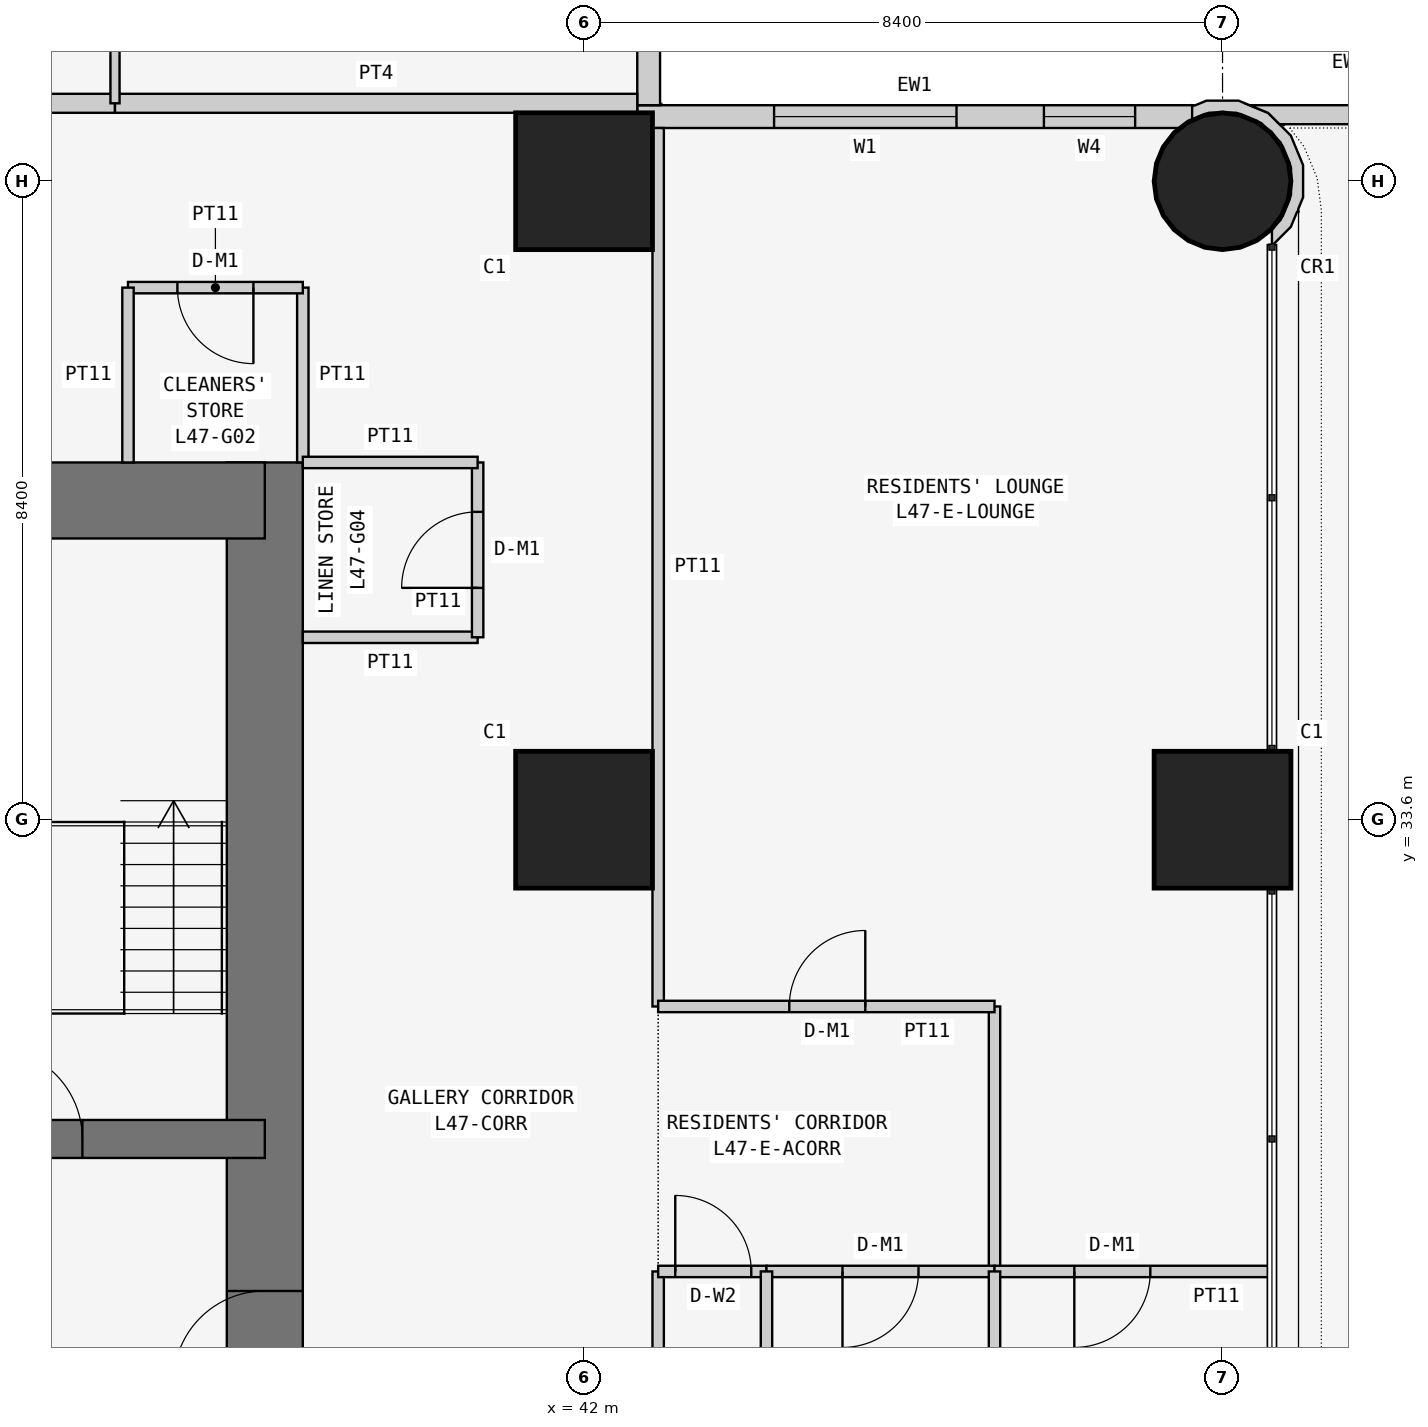
"""IFC4 building model, lengths in metres.
Left out: names, types, materials, properties, quantities, classifications, styles, units other than length and angle.
Written with IfcOpenShell. Run it as: python <this file> out.ifc"""

import sys

from ifc_helpers import new_model, si_unit, direction, frame, frame_2d, origin, origin_2d, place, context, subcontext, project, spatial, polyline, rectangle, circle, outline, extrude, element, fill, save


model = new_model("IFC4")
c1 = context("Model", 3, precision=1e-05, world=origin(), true_north=direction((0.0, 1.0)))
c2 = subcontext(c1, "Body", "Model", "MODEL_VIEW")
j1 = project(units=[si_unit("LENGTHUNIT", "METRE"), si_unit("PLANEANGLEUNIT", "RADIAN")], contexts=[c1])
p1 = place(None, origin())
s1 = spatial("IfcSite", under=j1, at=p1, CompositionType="ELEMENT")
p2 = place(p1, origin())
s2 = spatial("IfcBuilding", under=s1, at=p2, CompositionType="ELEMENT")
p3 = place(p2, frame((0.0, 0.0, 183.3)))
s3 = spatial("IfcBuildingStorey", under=s2, at=p3, CompositionType="ELEMENT", Elevation=183.3)
for number, where, z_axis, x_axis in (
    (1, (42.0, 33.6, 0.0), (0.0, 0.0, 1.0), (1.0, 0.0, 0.0)),
    (2, (42.0, 42.0, 0.0), (0.0, 0.0, 1.0), (1.0, 0.0, 0.0)),
    (3, (50.4, 33.6, 0.0), (0.0, 0.0, 1.0), (1.0, 0.0, 0.0)),
):
    element("IfcColumn", number, at=place(p3, frame(where, z_axis=z_axis, x_axis=x_axis)), inside=s3, PredefinedType="COLUMN", context=c2, shape_type="SweptSolid", body=[
        extrude(rectangle(XDim=1.8, YDim=1.8, at=origin_2d()), origin(), (0.0, 0.0, 1.0), 3.6),
    ])
p4 = place(p3, frame((50.4, 42.0, 0.0), z_axis=(0.0, 0.0, 1.0), x_axis=(1.0, 0.0, 0.0)))
e4 = element("IfcColumn", 4, at=p4, inside=s3, PredefinedType="COLUMN", context=c2, shape_type="SweptSolid", body=[
    extrude(circle(Radius=0.9, at=origin_2d()), origin(), (0.0, 0.0, 1.0), 3.6),
])
p5 = place(p3, frame((37.8, 21.0, 0.0), z_axis=(0.0, 0.0, 1.0), x_axis=(0.0, 1.0, 0.0)))
e5 = element("IfcWall", 5, at=p5, inside=s3, PredefinedType="SHEAR", context=c2, shape_type="SweptSolid", body=[
    extrude(rectangle(XDim=17.3, YDim=1.0, at=frame_2d((8.65, 0.0))), origin(), (0.0, 0.0, 1.0), 3.6),
])
p6 = place(p5, frame((5.2, 0.0, 0.0)))
e6 = element("IfcOpeningElement", 6, at=p6, cuts=e5, PredefinedType="OPENING", context=c2, shape_type="SweptSolid", body=[
    extrude(rectangle(XDim=1.2, YDim=2.1, at=frame_2d((0.6, 1.05))), frame((0.0, 0.51, 0.0), z_axis=(0.0, -1.0, 0.0), x_axis=(1.0, 0.0, 0.0)), (0.0, 0.0, 1.0), 1.02),
])
p7 = place(p3, frame((37.8, 37.8, 0.0), z_axis=(0.0, 0.0, 1.0), x_axis=(-1.0, 0.0, 0.0)))
e7 = element("IfcWall", 7, at=p7, inside=s3, PredefinedType="SHEAR", context=c2, shape_type="SweptSolid", body=[
    extrude(rectangle(XDim=17.3, YDim=1.0, at=frame_2d((8.65, 0.0))), origin(), (0.0, 0.0, 1.0), 3.6),
])
p8 = place(p3, frame((32.2, 29.4, 0.0), z_axis=(0.0, 0.0, 1.0), x_axis=(1.0, 0.0, 0.0)))
e8 = element("IfcWall", 8, at=p8, inside=s3, PredefinedType="SHEAR", context=c2, shape_type="SweptSolid", body=[
    extrude(rectangle(XDim=5.6, YDim=0.5, at=frame_2d((2.8, 0.0))), origin(), (0.0, 0.0, 1.0), 3.6),
])
p9 = place(p8, frame((2.0, 0.0, 0.0)))
e9 = element("IfcOpeningElement", 9, at=p9, cuts=e8, PredefinedType="OPENING", context=c2, shape_type="SweptSolid", body=[
    extrude(rectangle(XDim=1.2, YDim=2.1, at=frame_2d((0.6, 1.05))), frame((0.0, 0.26, 0.0), z_axis=(0.0, -1.0, 0.0), x_axis=(1.0, 0.0, 0.0)), (0.0, 0.0, 1.0), 0.52),
])
p10 = place(p3, frame((50.0, 42.85, 0.0), z_axis=(0.0, 0.0, 1.0), x_axis=(-1.0, 0.0, 0.0)))
e10 = element("IfcWall", 10, at=p10, inside=s3, PredefinedType="SOLIDWALL", context=c2, shape_type="SweptSolid", body=[
    extrude(rectangle(XDim=7.3, YDim=0.3, at=frame_2d((3.65, 0.0))), origin(), (0.0, 0.0, 1.0), 3.45),
])
p11 = place(p10, frame((3.1, 0.0, 0.9)))
e11 = element("IfcOpeningElement", 11, at=p11, cuts=e10, PredefinedType="OPENING", context=c2, shape_type="SweptSolid", body=[
    extrude(rectangle(XDim=2.4, YDim=1.5, at=frame_2d((1.2, 0.75))), frame((0.0, 0.16, 0.0), z_axis=(0.0, -1.0, 0.0), x_axis=(1.0, 0.0, 0.0)), (0.0, 0.0, 1.0), 0.32),
])
p12 = place(p10, frame((0.75, 0.0, 0.9)))
e12 = element("IfcOpeningElement", 12, at=p12, cuts=e10, PredefinedType="OPENING", context=c2, shape_type="SweptSolid", body=[
    extrude(rectangle(XDim=1.2, YDim=1.5, at=frame_2d((0.6, 0.75))), frame((0.0, 0.16, 0.0), z_axis=(0.0, -1.0, 0.0), x_axis=(1.0, 0.0, 0.0)), (0.0, 0.0, 1.0), 0.32),
])
p13 = place(p3, frame((42.85, 43.0, 0.0), z_axis=(0.0, 0.0, 1.0), x_axis=(0.0, 1.0, 0.0)))
e13 = element("IfcWall", 13, at=p13, inside=s3, PredefinedType="SOLIDWALL", context=c2, shape_type="SweptSolid", body=[
    extrude(rectangle(XDim=7.0, YDim=0.3, at=frame_2d((3.5, 0.0))), origin(), (0.0, 0.0, 1.0), 3.45),
])
p14 = place(p13, frame((1.5, 0.0, 0.9)))
e14 = element("IfcOpeningElement", 14, at=p14, cuts=e13, PredefinedType="OPENING", context=c2, shape_type="SweptSolid", body=[
    extrude(rectangle(XDim=2.4, YDim=1.5, at=frame_2d((1.2, 0.75))), frame((0.0, 0.16, 0.0), z_axis=(0.0, -1.0, 0.0), x_axis=(1.0, 0.0, 0.0)), (0.0, 0.0, 1.0), 0.32),
])
p15 = place(p13, frame((5.05, 0.0, 0.9)))
e15 = element("IfcOpeningElement", 15, at=p15, cuts=e13, PredefinedType="OPENING", context=c2, shape_type="SweptSolid", body=[
    extrude(rectangle(XDim=1.2, YDim=1.5, at=frame_2d((0.6, 0.75))), frame((0.0, 0.16, 0.0), z_axis=(0.0, -1.0, 0.0), x_axis=(1.0, 0.0, 0.0)), (0.0, 0.0, 1.0), 0.32),
])
p16 = place(p3, frame((51.011, 41.233, 0.0), z_axis=(0.0, 0.0, 1.0), x_axis=(0.926129809145, 0.377204953059, 0.0)))
e16 = element("IfcWall", 16, at=p16, inside=s3, PredefinedType="SOLIDWALL", context=c2, shape_type="SweptSolid", body=[
    extrude(outline(polyline([(0.626, 0.345), (0.785, 0.736), (0.782, 1.157), (0.619, 1.546), (0.319, 1.842), (-0.072, 2.002), (-0.24, 2.0), (-0.27, 2.017), (-0.37, 1.841), (-0.102, 1.842), (0.229, 1.707), (0.485, 1.455), (0.624, 1.125), (0.626, 0.766), (0.491, 0.434), (0.239, 0.179), (0.09, 0.117), (0.011, -0.078), (0.025, -0.083), (0.329, 0.045), (0.48, 0.198), (0.499, 0.193), (0.507, 0.225), (0.626, 0.345)])), origin(), (0.0, 0.0, 1.0), 3.45),
])
p17 = place(p3, origin())
e17 = element("IfcWall", 17, at=p17, inside=s3, PredefinedType="PARAPET", context=c2, shape_type="SweptSolid", body=[
    extrude(outline(polyline([(59.1, 42.812), (59.39, 42.59), (59.612, 42.3), (59.752, 41.962), (59.8, 41.6), (59.8, 17.2), (59.752, 16.838), (59.612, 16.5), (59.39, 16.21), (59.1, 15.988), (58.762, 15.848), (58.4, 15.8), (50.756, 15.8), (51.0, 15.901), (51.159, 16.06), (51.19, 16.06), (51.182, 16.05), (58.384, 16.05), (58.697, 16.091), (58.974, 16.206), (59.212, 16.388), (59.394, 16.626), (59.509, 16.903), (59.55, 17.216), (59.55, 41.583), (59.509, 41.897), (59.394, 42.174), (59.212, 42.412), (58.974, 42.594), (58.697, 42.709), (58.384, 42.75), (51.182, 42.75), (51.19, 42.74), (51.159, 42.74), (51.0, 42.899), (50.756, 43.0), (58.4, 43.0), (58.762, 42.952), (59.1, 42.812)])), origin(), (0.0, 0.0, 1.0), 1.25),
])
p18 = place(p3, frame((38.3, 38.3, 0.0), z_axis=(0.0, 0.0, 1.0), x_axis=(0.0, 1.0, 0.0)))
e18 = element("IfcWall", 18, at=p18, inside=s3, PredefinedType="PARTITIONING", context=c2, shape_type="SweptSolid", body=[
    extrude(rectangle(XDim=2.3, YDim=0.15, at=frame_2d((1.15, 0.0))), origin(), (0.0, 0.0, 1.0), 3.45),
])
p19 = place(p3, frame((38.3, 40.6, 0.0), z_axis=(0.0, 0.0, 1.0), x_axis=(-1.0, 0.0, 0.0)))
e19 = element("IfcWall", 19, at=p19, inside=s3, PredefinedType="PARTITIONING", context=c2, shape_type="SweptSolid", body=[
    extrude(rectangle(XDim=2.3, YDim=0.15, at=frame_2d((1.15, 0.0))), origin(), (0.0, 0.0, 1.0), 3.45),
])
p20 = place(p19, frame((0.65, 0.0, 0.0)))
e20 = element("IfcOpeningElement", 20, at=p20, cuts=e19, PredefinedType="OPENING", context=c2, shape_type="SweptSolid", body=[
    extrude(rectangle(XDim=1.0, YDim=2.1, at=frame_2d((0.5, 1.05))), frame((0.0, 0.085, 0.0), z_axis=(0.0, -1.0, 0.0), x_axis=(1.0, 0.0, 0.0)), (0.0, 0.0, 1.0), 0.17),
])
for number, where, z_axis, x_axis in (
    (21, (36.0, 40.6, 0.0), (0.0, 0.0, 1.0), (0.0, -1.0, 0.0)),
    (22, (38.3, 36.0, 0.0), (0.0, 0.0, 1.0), (1.0, 0.0, 0.0)),
):
    element("IfcWall", number, at=place(p3, frame(where, z_axis=z_axis, x_axis=x_axis)), inside=s3, PredefinedType="PARTITIONING", context=c2, shape_type="SweptSolid", body=[
        extrude(rectangle(XDim=2.3, YDim=0.15, at=frame_2d((1.15, 0.0))), origin(), (0.0, 0.0, 1.0), 3.45),
    ])
p21 = place(p3, frame((40.6, 36.0, 0.0), z_axis=(0.0, 0.0, 1.0), x_axis=(0.0, 1.0, 0.0)))
e23 = element("IfcWall", 23, at=p21, inside=s3, PredefinedType="PARTITIONING", context=c2, shape_type="SweptSolid", body=[
    extrude(rectangle(XDim=2.3, YDim=0.15, at=frame_2d((1.15, 0.0))), origin(), (0.0, 0.0, 1.0), 3.45),
])
p22 = place(p21, frame((0.65, 0.0, 0.0)))
e24 = element("IfcOpeningElement", 24, at=p22, cuts=e23, PredefinedType="OPENING", context=c2, shape_type="SweptSolid", body=[
    extrude(rectangle(XDim=1.0, YDim=2.1, at=frame_2d((0.5, 1.05))), frame((0.0, 0.085, 0.0), z_axis=(0.0, -1.0, 0.0), x_axis=(1.0, 0.0, 0.0)), (0.0, 0.0, 1.0), 0.17),
])
p23 = place(p3, frame((40.6, 38.3, 0.0), z_axis=(0.0, 0.0, 1.0), x_axis=(-1.0, 0.0, 0.0)))
e25 = element("IfcWall", 25, at=p23, inside=s3, PredefinedType="PARTITIONING", context=c2, shape_type="SweptSolid", body=[
    extrude(rectangle(XDim=2.3, YDim=0.15, at=frame_2d((1.15, 0.0))), origin(), (0.0, 0.0, 1.0), 3.45),
])
p24 = place(p3, frame((29.4, 43.025, 0.0), z_axis=(0.0, 0.0, 1.0), x_axis=(1.0, 0.0, 0.0)))
e26 = element("IfcWall", 26, at=p24, inside=s3, PredefinedType="PARTITIONING", context=c2, shape_type="SweptSolid", body=[
    extrude(rectangle(XDim=6.429, YDim=0.25, at=frame_2d((3.215, 0.0))), origin(), (0.0, 0.0, 1.0), 3.45),
])
p25 = place(p24, frame((0.5, 0.0, 0.0)))
e27 = element("IfcOpeningElement", 27, at=p25, cuts=e26, PredefinedType="OPENING", context=c2, shape_type="SweptSolid", body=[
    extrude(rectangle(XDim=1.0, YDim=2.1, at=frame_2d((0.5, 1.05))), frame((0.0, 0.135, 0.0), z_axis=(0.0, -1.0, 0.0), x_axis=(1.0, 0.0, 0.0)), (0.0, 0.0, 1.0), 0.27),
])
p26 = place(p3, frame((35.829, 43.025, 0.0), z_axis=(0.0, 0.0, 1.0), x_axis=(1.0, 0.0, 0.0)))
e28 = element("IfcWall", 28, at=p26, inside=s3, PredefinedType="PARTITIONING", context=c2, shape_type="SweptSolid", body=[
    extrude(rectangle(XDim=6.871, YDim=0.25, at=frame_2d((3.436, 0.0))), origin(), (0.0, 0.0, 1.0), 3.45),
])
for number, where, z_axis, x_axis in (
    (29, (42.975, 42.7, 0.0), (0.0, 0.0, 1.0), (0.0, -1.0, 0.0)),
    (30, (42.975, 27.657, 0.0), (0.0, 0.0, 1.0), (0.0, -1.0, 0.0)),
):
    element("IfcWall", number, at=place(p3, frame(where, z_axis=z_axis, x_axis=x_axis)), inside=s3, PredefinedType="PARTITIONING", context=c2, shape_type="SweptSolid", body=[
        extrude(rectangle(XDim=11.557, YDim=0.15, at=frame_2d((5.778, 0.0))), origin(), (0.0, 0.0, 1.0), 3.45),
    ])
p27 = place(p3, frame((35.829, 47.8, 0.0), z_axis=(0.0, 0.0, 1.0), x_axis=(0.0, -1.0, 0.0)))
e31 = element("IfcWall", 31, at=p27, inside=s3, PredefinedType="PARTITIONING", context=c2, shape_type="SweptSolid", body=[
    extrude(rectangle(XDim=4.775, YDim=0.12, at=frame_2d((2.388, 0.0))), origin(), (0.0, 0.0, 1.0), 3.45),
])
p28 = place(p27, frame((1.85, 0.0, 0.0)))
e32 = element("IfcOpeningElement", 32, at=p28, cuts=e31, PredefinedType="OPENING", context=c2, shape_type="SweptSolid", body=[
    extrude(rectangle(XDim=0.9, YDim=2.1, at=frame_2d((0.45, 1.05))), frame((0.0, 0.07, 0.0), z_axis=(0.0, -1.0, 0.0), x_axis=(1.0, 0.0, 0.0)), (0.0, 0.0, 1.0), 0.14),
])
p29 = place(p3, frame((47.4, 27.657, 0.0), z_axis=(0.0, 0.0, 1.0), x_axis=(0.0, 1.0, 0.0)))
e33 = element("IfcWall", 33, at=p29, inside=s3, PredefinedType="PARTITIONING", context=c2, shape_type="SweptSolid", body=[
    extrude(rectangle(XDim=3.486, YDim=0.15, at=frame_2d((1.743, 0.0))), origin(), (0.0, 0.0, 1.0), 3.45),
])
p30 = place(p3, frame((47.4, 31.143, 0.0), z_axis=(0.0, 0.0, 1.0), x_axis=(-1.0, 0.0, 0.0)))
e34 = element("IfcWall", 34, at=p30, inside=s3, PredefinedType="PARTITIONING", context=c2, shape_type="SweptSolid", body=[
    extrude(rectangle(XDim=4.425, YDim=0.15, at=frame_2d((2.212, 0.0))), origin(), (0.0, 0.0, 1.0), 3.45),
])
p31 = place(p30, frame((1.7, 0.0, 0.0)))
e35 = element("IfcOpeningElement", 35, at=p31, cuts=e34, PredefinedType="OPENING", context=c2, shape_type="SweptSolid", body=[
    extrude(rectangle(XDim=1.0, YDim=2.1, at=frame_2d((0.5, 1.05))), frame((0.0, 0.085, 0.0), z_axis=(0.0, -1.0, 0.0), x_axis=(1.0, 0.0, 0.0)), (0.0, 0.0, 1.0), 0.17),
])
p32 = place(p3, frame((42.975, 27.657, 0.0), z_axis=(0.0, 0.0, 1.0), x_axis=(1.0, 0.0, 0.0)))
e36 = element("IfcWall", 36, at=p32, inside=s3, PredefinedType="PARTITIONING", context=c2, shape_type="SweptSolid", body=[
    extrude(rectangle(XDim=1.425, YDim=0.15, at=frame_2d((0.712, 0.0))), origin(), (0.0, 0.0, 1.0), 3.45),
])
p33 = place(p32, frame((0.225, 0.0, 0.0)))
e37 = element("IfcOpeningElement", 37, at=p33, cuts=e36, PredefinedType="OPENING", context=c2, shape_type="SweptSolid", body=[
    extrude(rectangle(XDim=1.0, YDim=2.1, at=frame_2d((0.5, 1.05))), frame((0.0, 0.085, 0.0), z_axis=(0.0, -1.0, 0.0), x_axis=(1.0, 0.0, 0.0)), (0.0, 0.0, 1.0), 0.17),
])
p34 = place(p3, frame((44.4, 27.657, 0.0), z_axis=(0.0, 0.0, 1.0), x_axis=(1.0, 0.0, 0.0)))
e38 = element("IfcWall", 38, at=p34, inside=s3, PredefinedType="PARTITIONING", context=c2, shape_type="SweptSolid", body=[
    extrude(rectangle(XDim=3.0, YDim=0.15, at=frame_2d((1.5, 0.0))), origin(), (0.0, 0.0, 1.0), 3.45),
])
p35 = place(p34, frame((1.0, 0.0, 0.0)))
e39 = element("IfcOpeningElement", 39, at=p35, cuts=e38, PredefinedType="OPENING", context=c2, shape_type="SweptSolid", body=[
    extrude(rectangle(XDim=1.0, YDim=2.1, at=frame_2d((0.5, 1.05))), frame((0.0, 0.085, 0.0), z_axis=(0.0, -1.0, 0.0), x_axis=(1.0, 0.0, 0.0)), (0.0, 0.0, 1.0), 0.17),
])
p36 = place(p3, frame((51.05, 27.657, 0.0), z_axis=(0.0, 0.0, 1.0), x_axis=(-1.0, 0.0, 0.0)))
e40 = element("IfcWall", 40, at=p36, inside=s3, PredefinedType="PARTITIONING", context=c2, shape_type="SweptSolid", body=[
    extrude(rectangle(XDim=3.65, YDim=0.15, at=frame_2d((1.825, 0.0))), origin(), (0.0, 0.0, 1.0), 3.45),
])
p37 = place(p36, frame((1.6, 0.0, 0.0)))
e41 = element("IfcOpeningElement", 41, at=p37, cuts=e40, PredefinedType="OPENING", context=c2, shape_type="SweptSolid", body=[
    extrude(rectangle(XDim=1.0, YDim=2.1, at=frame_2d((0.5, 1.05))), frame((0.0, 0.085, 0.0), z_axis=(0.0, -1.0, 0.0), x_axis=(1.0, 0.0, 0.0)), (0.0, 0.0, 1.0), 0.17),
])
for number, where, z_axis, x_axis in (
    (42, (44.4, 16.1, 0.0), (0.0, 0.0, 1.0), (0.0, 1.0, 0.0)),
    (43, (47.4, 16.1, 0.0), (0.0, 0.0, 1.0), (0.0, 1.0, 0.0)),
):
    element("IfcWall", number, at=place(p3, frame(where, z_axis=z_axis, x_axis=x_axis)), inside=s3, PredefinedType="PARTITIONING", context=c2, shape_type="SweptSolid", body=[
        extrude(rectangle(XDim=11.557, YDim=0.15, at=frame_2d((5.778, 0.0))), origin(), (0.0, 0.0, 1.0), 3.45),
    ])
p38 = place(p11, origin())
e44 = element("IfcWindow", 44, at=p38, inside=s3, PartitioningType="SINGLE_PANEL", PredefinedType="WINDOW", context=c2, shape_type="SweptSolid", body=[
    extrude(rectangle(XDim=2.4, YDim=1.5, at=frame_2d((1.2, 0.75))), frame((0.0, 0.03, 0.0), z_axis=(0.0, -1.0, 0.0), x_axis=(1.0, 0.0, 0.0)), (0.0, 0.0, 1.0), 0.06),
])
fill(e11, e44)
p39 = place(p12, origin())
e45 = element("IfcWindow", 45, at=p39, inside=s3, PartitioningType="SINGLE_PANEL", PredefinedType="WINDOW", context=c2, shape_type="SweptSolid", body=[
    extrude(rectangle(XDim=1.2, YDim=1.5, at=frame_2d((0.6, 0.75))), frame((0.0, 0.03, 0.0), z_axis=(0.0, -1.0, 0.0), x_axis=(1.0, 0.0, 0.0)), (0.0, 0.0, 1.0), 0.06),
])
fill(e12, e45)
p40 = place(p20, origin())
e46 = element("IfcDoor", 46, at=p40, inside=s3, OperationType="SINGLE_SWING_LEFT", PredefinedType="DOOR", context=c2, shape_type="SweptSolid", body=[
    extrude(rectangle(XDim=1.0, YDim=2.1, at=frame_2d((0.5, 1.05))), frame((0.0, 0.025, 0.0), z_axis=(0.0, -1.0, 0.0), x_axis=(1.0, 0.0, 0.0)), (0.0, 0.0, 1.0), 0.05),
])
fill(e20, e46)
p41 = place(p22, origin())
e47 = element("IfcDoor", 47, at=p41, inside=s3, OperationType="SINGLE_SWING_LEFT", PredefinedType="DOOR", context=c2, shape_type="SweptSolid", body=[
    extrude(rectangle(XDim=1.0, YDim=2.1, at=frame_2d((0.5, 1.05))), frame((0.0, 0.025, 0.0), z_axis=(0.0, -1.0, 0.0), x_axis=(1.0, 0.0, 0.0)), (0.0, 0.0, 1.0), 0.05),
])
fill(e24, e47)
p42 = place(p31, frame((1.0, 0.0, 0.0), z_axis=(0.0, 0.0, 1.0), x_axis=(-1.0, 0.0, 0.0)))
e48 = element("IfcDoor", 48, at=p42, inside=s3, OperationType="SINGLE_SWING_RIGHT", PredefinedType="DOOR", context=c2, shape_type="SweptSolid", body=[
    extrude(rectangle(XDim=1.0, YDim=2.1, at=frame_2d((0.5, 1.05))), frame((0.0, 0.025, 0.0), z_axis=(0.0, -1.0, 0.0), x_axis=(1.0, 0.0, 0.0)), (0.0, 0.0, 1.0), 0.05),
])
fill(e35, e48)
p43 = place(p33, origin())
e49 = element("IfcDoor", 49, at=p43, inside=s3, OperationType="SINGLE_SWING_LEFT", PredefinedType="DOOR", context=c2, shape_type="SweptSolid", body=[
    extrude(rectangle(XDim=1.0, YDim=2.1, at=frame_2d((0.5, 1.05))), frame((0.0, 0.025, 0.0), z_axis=(0.0, -1.0, 0.0), x_axis=(1.0, 0.0, 0.0)), (0.0, 0.0, 1.0), 0.05),
])
fill(e37, e49)
p44 = place(p35, frame((1.0, 0.0, 0.0), z_axis=(0.0, 0.0, 1.0), x_axis=(-1.0, 0.0, 0.0)))
e50 = element("IfcDoor", 50, at=p44, inside=s3, OperationType="SINGLE_SWING_RIGHT", PredefinedType="DOOR", context=c2, shape_type="SweptSolid", body=[
    extrude(rectangle(XDim=1.0, YDim=2.1, at=frame_2d((0.5, 1.05))), frame((0.0, 0.025, 0.0), z_axis=(0.0, -1.0, 0.0), x_axis=(1.0, 0.0, 0.0)), (0.0, 0.0, 1.0), 0.05),
])
fill(e39, e50)
p45 = place(p37, origin())
e51 = element("IfcDoor", 51, at=p45, inside=s3, OperationType="SINGLE_SWING_RIGHT", PredefinedType="DOOR", context=c2, shape_type="SweptSolid", body=[
    extrude(rectangle(XDim=1.0, YDim=2.1, at=frame_2d((0.5, 1.05))), frame((0.0, 0.025, 0.0), z_axis=(0.0, -1.0, 0.0), x_axis=(1.0, 0.0, 0.0)), (0.0, 0.0, 1.0), 0.05),
])
fill(e41, e51)
p46 = place(p6, origin())
e52 = element("IfcDoor", 52, at=p46, inside=s3, OperationType="SINGLE_SWING_LEFT", PredefinedType="DOOR", context=c2, shape_type="SweptSolid", body=[
    extrude(rectangle(XDim=1.2, YDim=2.1, at=frame_2d((0.6, 1.05))), frame((0.0, 0.025, 0.0), z_axis=(0.0, -1.0, 0.0), x_axis=(1.0, 0.0, 0.0)), (0.0, 0.0, 1.0), 0.05),
])
fill(e6, e52)
p47 = place(p9, origin())
e53 = element("IfcDoor", 53, at=p47, inside=s3, OperationType="SINGLE_SWING_LEFT", PredefinedType="DOOR", context=c2, shape_type="SweptSolid", body=[
    extrude(rectangle(XDim=1.2, YDim=2.1, at=frame_2d((0.6, 1.05))), frame((0.0, 0.025, 0.0), z_axis=(0.0, -1.0, 0.0), x_axis=(1.0, 0.0, 0.0)), (0.0, 0.0, 1.0), 0.05),
])
fill(e9, e53)
save(model, sys.argv[1])
